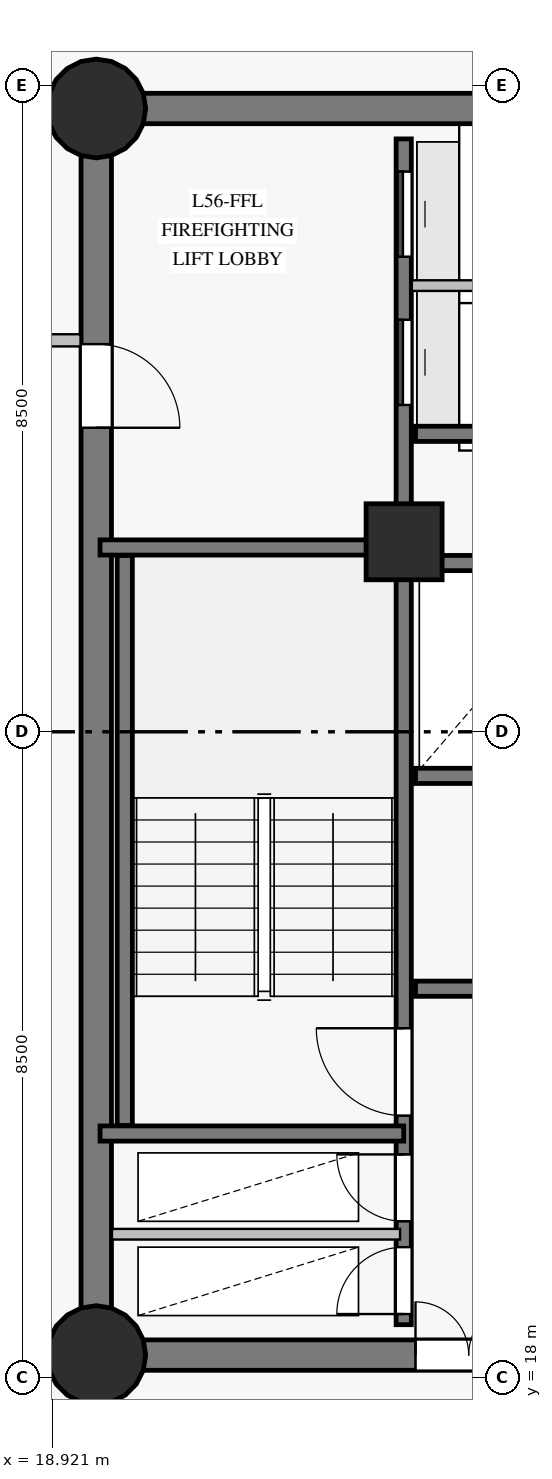
"""IFC4 building model, lengths in metres.
Left out: names, types, materials, properties, quantities, classifications, styles, units other than length and angle.
Written with IfcOpenShell. Run it as: python <this file> out.ifc"""

import sys

from ifc_helpers import new_model, si_unit, direction, frame, frame_2d, origin, origin_with_axes, origin_2d, place, context, subcontext, project, spatial, rectangle, circle, extrude, source, transform, mapped, element, fill, save


model = new_model("IFC4")
c1 = context("Model", 3, precision=1e-05, world=origin(), true_north=direction((0.0, 1.0)))
c2 = subcontext(c1, "Body", "Model", "MODEL_VIEW")
j1 = project(units=[si_unit("LENGTHUNIT", "METRE"), si_unit("PLANEANGLEUNIT", "RADIAN")], contexts=[c1])
p1 = place(None, origin())
s1 = spatial("IfcSite", under=j1, at=p1, CompositionType="ELEMENT")
p2 = place(p1, origin())
s2 = spatial("IfcBuilding", under=s1, at=p2, CompositionType="ELEMENT")
p3 = place(p2, frame((0.0, 0.0, 193.15)))
s3 = spatial("IfcBuildingStorey", under=s2, at=p3, CompositionType="ELEMENT", Elevation=193.15)
p4 = place(p3, frame((19.5, 18.3, 0.0), z_axis=(0.0, 0.0, 1.0), x_axis=(1.0, 0.0, 0.0)))
e1 = element("IfcWall", 1, at=p4, inside=s3, PredefinedType="SHEAR", context=c2, shape_type="SweptSolid", body=[
    extrude(rectangle(XDim=7.05, YDim=0.4, at=frame_2d((3.525, 0.0))), origin(), (0.0, 0.0, 1.0), 2.825),
])
p5 = place(p4, frame((4.2, 0.0, 0.0)))
e2 = element("IfcOpeningElement", 2, at=p5, cuts=e1, PredefinedType="OPENING", context=c2, shape_type="SweptSolid", body=[
    extrude(rectangle(XDim=1.4, YDim=2.2, at=frame_2d((0.7, 1.1))), frame((0.0, 0.21, 0.0), z_axis=(0.0, -1.0, 0.0), x_axis=(1.0, 0.0, 0.0)), (0.0, 0.0, 1.0), 0.42),
])
p6 = place(p3, frame((26.55, 34.7, 0.0), z_axis=(0.0, 0.0, 1.0), x_axis=(-1.0, 0.0, 0.0)))
e3 = element("IfcWall", 3, at=p6, inside=s3, PredefinedType="SHEAR", context=c2, shape_type="SweptSolid", body=[
    extrude(rectangle(XDim=7.05, YDim=0.4, at=frame_2d((3.525, 0.0))), origin(), (0.0, 0.0, 1.0), 2.825),
])
p7 = place(p3, frame((19.5, 34.7, 0.0), z_axis=(0.0, 0.0, 1.0), x_axis=(0.0, -1.0, 0.0)))
e4 = element("IfcWall", 4, at=p7, inside=s3, PredefinedType="SHEAR", context=c2, shape_type="SweptSolid", body=[
    extrude(rectangle(XDim=16.4, YDim=0.4, at=frame_2d((8.2, 0.0))), origin(), (0.0, 0.0, 1.0), 2.825),
])
p8 = place(p7, frame((3.1, 0.0, 0.0)))
e5 = element("IfcOpeningElement", 5, at=p8, cuts=e4, PredefinedType="OPENING", context=c2, shape_type="SweptSolid", body=[
    extrude(rectangle(XDim=1.1, YDim=2.15, at=frame_2d((0.55, 1.075))), frame((0.0, 0.21, 0.0), z_axis=(0.0, -1.0, 0.0), x_axis=(1.0, 0.0, 0.0)), (0.0, 0.0, 1.0), 0.42),
])
m1 = source(origin_with_axes(), c2, "Body", "SweptSolid", [
    extrude(circle(Radius=0.65, at=origin_2d()), origin(), (0.0, 0.0, 1.0), 3.05),
])
for number, where, z_axis, x_axis in (
    (6, (19.5, 18.3, 0.0), (0.0, 0.0, 1.0), (1.0, 0.0, 0.0)),
    (7, (19.5, 34.7, 0.0), (0.0, 0.0, 1.0), (1.0, 0.0, 0.0)),
):
    element("IfcColumn", number, at=place(p3, frame(where, z_axis=z_axis, x_axis=x_axis)), inside=s3, PredefinedType="COLUMN", context=c2, shape_type="MappedRepresentation", body=[
        mapped(m1, transform((0.0, 0.0, 0.0), scale=1.0)),
    ])
m2 = source(origin_with_axes(), c2, "Body", "SweptSolid", [
    extrude(rectangle(XDim=1.0, YDim=1.0, at=origin_2d()), origin(), (0.0, 0.0, 1.0), 3.05),
])
p9 = place(p3, frame((23.55, 29.0, 0.0), z_axis=(0.0, 0.0, 1.0), x_axis=(1.0, 0.0, 0.0)))
e8 = element("IfcColumn", 8, at=p9, inside=s3, PredefinedType="COLUMN", context=c2, shape_type="MappedRepresentation", body=[
    mapped(m2, transform((0.0, 0.0, 0.0), scale=1.0)),
])
p10 = place(p3, frame((23.545, 18.7, 0.0), z_axis=(0.0, 0.0, 1.0), x_axis=(0.0, 1.0, 0.0)))
e9 = element("IfcWall", 9, at=p10, inside=s3, PredefinedType="SHEAR", context=c2, shape_type="SweptSolid", body=[
    extrude(rectangle(XDim=15.6, YDim=0.2, at=frame_2d((7.8, 0.0))), origin(), (0.0, 0.0, 1.0), 2.825),
])
p11 = place(p10, frame((2.75, 0.0, 0.0)))
e10 = element("IfcOpeningElement", 10, at=p11, cuts=e9, PredefinedType="OPENING", context=c2, shape_type="SweptSolid", body=[
    extrude(rectangle(XDim=1.15, YDim=2.15, at=frame_2d((0.575, 1.075))), frame((0.0, 0.11, 0.0), z_axis=(0.0, -1.0, 0.0), x_axis=(1.0, 0.0, 0.0)), (0.0, 0.0, 1.0), 0.22),
])
p12 = place(p10, frame((0.14, 0.0, 0.0)))
e11 = element("IfcOpeningElement", 11, at=p12, cuts=e9, PredefinedType="OPENING", context=c2, shape_type="SweptSolid", body=[
    extrude(rectangle(XDim=0.88, YDim=2.1, at=frame_2d((0.44, 1.05))), frame((0.0, 0.11, 0.0), z_axis=(0.0, -1.0, 0.0), x_axis=(1.0, 0.0, 0.0)), (0.0, 0.0, 1.0), 0.22),
])
p13 = place(p10, frame((1.36, 0.0, 0.0)))
e12 = element("IfcOpeningElement", 12, at=p13, cuts=e9, PredefinedType="OPENING", context=c2, shape_type="SweptSolid", body=[
    extrude(rectangle(XDim=0.88, YDim=2.1, at=frame_2d((0.44, 1.05))), frame((0.0, 0.11, 0.0), z_axis=(0.0, -1.0, 0.0), x_axis=(1.0, 0.0, 0.0)), (0.0, 0.0, 1.0), 0.22),
])
p14 = place(p10, frame((12.1, 0.0, 0.0)))
e13 = element("IfcOpeningElement", 13, at=p14, cuts=e9, PredefinedType="OPENING", context=c2, shape_type="SweptSolid", body=[
    extrude(rectangle(XDim=1.12, YDim=2.15, at=frame_2d((0.56, 1.075))), frame((0.0, 0.11, 0.0), z_axis=(0.0, -1.0, 0.0), x_axis=(1.0, 0.0, 0.0)), (0.0, 0.0, 1.0), 0.22),
])
p15 = place(p10, frame((14.05, 0.0, 0.0)))
e14 = element("IfcOpeningElement", 14, at=p15, cuts=e9, PredefinedType="OPENING", context=c2, shape_type="SweptSolid", body=[
    extrude(rectangle(XDim=1.12, YDim=2.15, at=frame_2d((0.56, 1.075))), frame((0.0, 0.11, 0.0), z_axis=(0.0, -1.0, 0.0), x_axis=(1.0, 0.0, 0.0)), (0.0, 0.0, 1.0), 0.22),
])
p16 = place(p3, frame((23.7, 23.12, 0.0), z_axis=(0.0, 0.0, 1.0), x_axis=(1.0, 0.0, 0.0)))
e15 = element("IfcWall", 15, at=p16, inside=s3, PredefinedType="SHEAR", context=c2, shape_type="SweptSolid", body=[
    extrude(rectangle(XDim=9.6, YDim=0.2, at=frame_2d((4.8, 0.0))), origin(), (0.0, 0.0, 1.0), 2.825),
])
p17 = place(p16, frame((4.2, 0.0, 0.0)))
e16 = element("IfcOpeningElement", 16, at=p17, cuts=e15, PredefinedType="OPENING", context=c2, shape_type="SweptSolid", body=[
    extrude(rectangle(XDim=1.0, YDim=2.15, at=frame_2d((0.5, 1.075))), frame((0.0, 0.11, 0.0), z_axis=(0.0, -1.0, 0.0), x_axis=(1.0, 0.0, 0.0)), (0.0, 0.0, 1.0), 0.22),
])
for number, where, z_axis, x_axis in (
    (17, (23.7, 25.92, 0.0), (0.0, 0.0, 1.0), (1.0, 0.0, 0.0)),
    (18, (23.7, 28.72, 0.0), (0.0, 0.0, 1.0), (1.0, 0.0, 0.0)),
):
    element("IfcWall", number, at=place(p3, frame(where, z_axis=z_axis, x_axis=x_axis)), inside=s3, PredefinedType="SHEAR", context=c2, shape_type="SweptSolid", body=[
        extrude(rectangle(XDim=9.6, YDim=0.2, at=frame_2d((4.8, 0.0))), origin(), (0.0, 0.0, 1.0), 2.825),
    ])
p18 = place(p3, frame((19.875, 21.32, 0.0), z_axis=(0.0, 0.0, 1.0), x_axis=(0.0, 1.0, 0.0)))
e19 = element("IfcWall", 19, at=p18, inside=s3, PredefinedType="SHEAR", context=c2, shape_type="SweptSolid", body=[
    extrude(rectangle(XDim=7.5, YDim=0.2, at=frame_2d((3.75, 0.0))), origin(), (0.0, 0.0, 1.0), 2.825),
])
for number, where, z_axis, x_axis in (
    (20, (19.55, 21.215, 0.0), (0.0, 0.0, 1.0), (1.0, 0.0, 0.0)),
    (21, (19.55, 28.925, 0.0), (0.0, 0.0, 1.0), (1.0, 0.0, 0.0)),
):
    element("IfcWall", number, at=place(p3, frame(where, z_axis=z_axis, x_axis=x_axis)), inside=s3, PredefinedType="SHEAR", context=c2, shape_type="SweptSolid", body=[
        extrude(rectangle(XDim=3.995, YDim=0.2, at=frame_2d((1.998, 0.0))), origin(), (0.0, 0.0, 1.0), 2.825),
    ])
p19 = place(p3, frame((23.7, 30.42, 0.0), z_axis=(0.0, 0.0, 1.0), x_axis=(1.0, 0.0, 0.0)))
e22 = element("IfcWall", 22, at=p19, inside=s3, PredefinedType="SHEAR", context=c2, shape_type="SweptSolid", body=[
    extrude(rectangle(XDim=2.78, YDim=0.2, at=frame_2d((1.39, 0.0))), origin(), (0.0, 0.0, 1.0), 2.825),
])
p20 = place(p3, frame((19.707, 19.89, 0.0), z_axis=(0.0, 0.0, 1.0), x_axis=(1.0, 0.0, 0.0)))
e23 = element("IfcWall", 23, at=p20, inside=s3, PredefinedType="PARTITIONING", context=c2, shape_type="SweptSolid", body=[
    extrude(rectangle(XDim=3.79, YDim=0.14, at=frame_2d((1.895, 0.0))), origin(), (0.0, 0.0, 1.0), 2.825),
])
p21 = place(p3, frame((23.652, 32.37, 0.0), z_axis=(0.0, 0.0, 1.0), x_axis=(1.0, 0.0, 0.0)))
e24 = element("IfcWall", 24, at=p21, inside=s3, PredefinedType="PARTITIONING", context=c2, shape_type="SweptSolid", body=[
    extrude(rectangle(XDim=2.828, YDim=0.14, at=frame_2d((1.414, 0.0))), origin(), (0.0, 0.0, 1.0), 2.825),
])
p22 = place(p3, frame((16.75, 31.65, 0.0), z_axis=(0.0, 0.0, 1.0), x_axis=(1.0, 0.0, 0.0)))
e25 = element("IfcWall", 25, at=p22, inside=s3, PredefinedType="PARTITIONING", context=c2, shape_type="SweptSolid", body=[
    extrude(rectangle(XDim=2.543, YDim=0.16, at=frame_2d((1.271, 0.0))), origin(), (0.0, 0.0, 1.0), 2.825),
])
m3 = source(origin_with_axes(), c2, "Body", "SweptSolid", [
    extrude(rectangle(XDim=1.15, YDim=2.15, at=frame_2d((0.575, 1.075))), frame((0.0, 0.025, 0.0), z_axis=(0.0, -1.0, 0.0), x_axis=(1.0, 0.0, 0.0)), (0.0, 0.0, 1.0), 0.05),
])
p23 = place(p11, origin())
e26 = element("IfcDoor", 26, at=p23, inside=s3, OperationType="SINGLE_SWING_RIGHT", PredefinedType="DOOR", context=c2, shape_type="MappedRepresentation", body=[
    mapped(m3, transform((0.0, 0.0, 0.0), scale=1.0)),
])
fill(e10, e26)
m4 = source(origin_with_axes(), c2, "Body", "SweptSolid", [
    extrude(rectangle(XDim=1.1, YDim=2.15, at=frame_2d((0.55, 1.075))), frame((0.0, 0.025, 0.0), z_axis=(0.0, -1.0, 0.0), x_axis=(1.0, 0.0, 0.0)), (0.0, 0.0, 1.0), 0.05),
])
p24 = place(p8, origin())
e27 = element("IfcDoor", 27, at=p24, inside=s3, OperationType="SINGLE_SWING_RIGHT", PredefinedType="DOOR", context=c2, shape_type="MappedRepresentation", body=[
    mapped(m4, transform((0.0, 0.0, 0.0), scale=1.0)),
])
fill(e5, e27)
m5 = source(origin_with_axes(), c2, "Body", "SweptSolid", [
    extrude(rectangle(XDim=0.88, YDim=2.1, at=frame_2d((0.44, 1.05))), frame((0.0, 0.025, 0.0), z_axis=(0.0, -1.0, 0.0), x_axis=(1.0, 0.0, 0.0)), (0.0, 0.0, 1.0), 0.05),
])
p25 = place(p12, origin())
e28 = element("IfcDoor", 28, at=p25, inside=s3, OperationType="SINGLE_SWING_LEFT", PredefinedType="DOOR", context=c2, shape_type="MappedRepresentation", body=[
    mapped(m5, transform((0.0, 0.0, 0.0), scale=1.0)),
])
fill(e11, e28)
p26 = place(p13, origin())
e29 = element("IfcDoor", 29, at=p26, inside=s3, OperationType="SINGLE_SWING_RIGHT", PredefinedType="DOOR", context=c2, shape_type="MappedRepresentation", body=[
    mapped(m5, transform((0.0, 0.0, 0.0), scale=1.0)),
])
fill(e12, e29)
m6 = source(origin_with_axes(), c2, "Body", "SweptSolid", [
    extrude(rectangle(XDim=1.4, YDim=2.2, at=frame_2d((0.7, 1.1))), frame((0.0, 0.025, 0.0), z_axis=(0.0, -1.0, 0.0), x_axis=(1.0, 0.0, 0.0)), (0.0, 0.0, 1.0), 0.05),
])
p27 = place(p5, origin())
e30 = element("IfcDoor", 30, at=p27, inside=s3, OperationType="DOUBLE_DOOR_SINGLE_SWING", PredefinedType="DOOR", context=c2, shape_type="MappedRepresentation", body=[
    mapped(m6, transform((0.0, 0.0, 0.0), scale=1.0)),
])
fill(e2, e30)
m7 = source(origin_with_axes(), c2, "Body", "SweptSolid", [
    extrude(rectangle(XDim=1.12, YDim=2.15, at=frame_2d((0.56, 1.075))), frame((0.0, 0.025, 0.0), z_axis=(0.0, -1.0, 0.0), x_axis=(1.0, 0.0, 0.0)), (0.0, 0.0, 1.0), 0.05),
])
p28 = place(p14, origin())
e31 = element("IfcDoor", 31, at=p28, inside=s3, OperationType="SLIDING_TO_LEFT", PredefinedType="DOOR", context=c2, shape_type="MappedRepresentation", body=[
    mapped(m7, transform((0.0, 0.0, 0.0), scale=1.0)),
])
fill(e13, e31)
p29 = place(p15, origin())
e32 = element("IfcDoor", 32, at=p29, inside=s3, OperationType="SLIDING_TO_RIGHT", PredefinedType="DOOR", context=c2, shape_type="MappedRepresentation", body=[
    mapped(m7, transform((0.0, 0.0, 0.0), scale=1.0)),
])
fill(e14, e32)
save(model, sys.argv[1])
